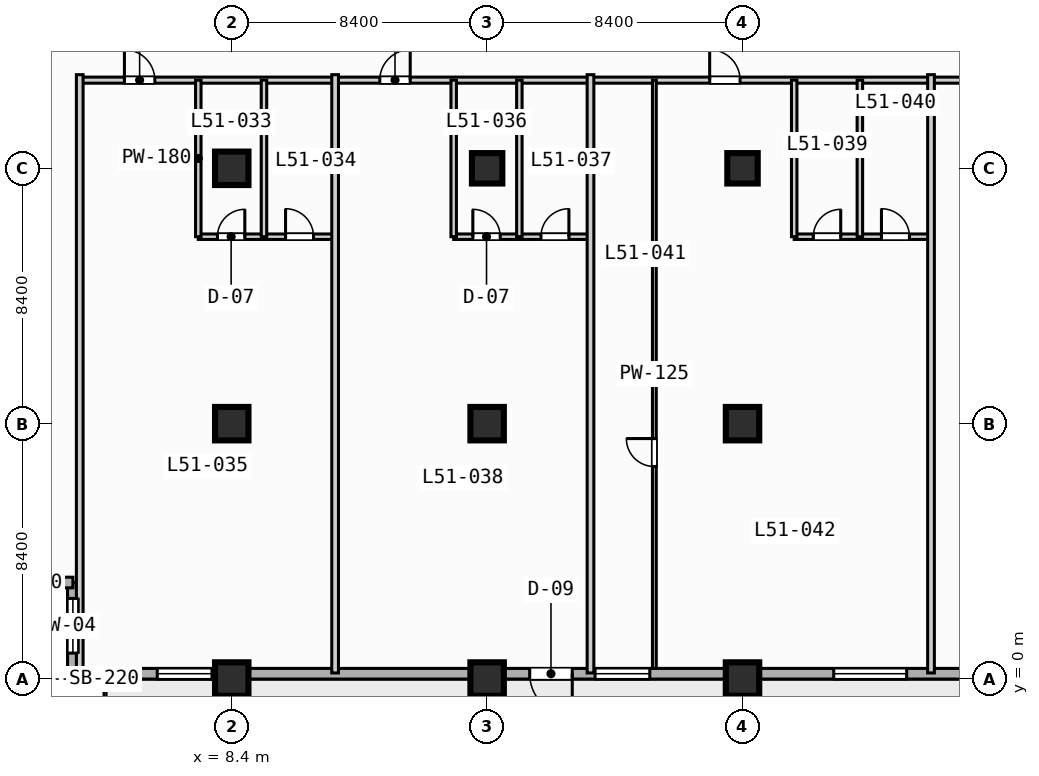
"""IFC4 building model, lengths in metres.
Left out: names, types, materials, properties, quantities, classifications, styles, units other than length and angle.
Written with IfcOpenShell. Run it as: python <this file> out.ifc"""

import sys

from ifc_helpers import new_model, si_unit, direction, frame, frame_2d, origin, origin_2d, place, context, subcontext, project, spatial, rectangle, extrude, element, fill, save


model = new_model("IFC4")
c1 = context("Model", 3, precision=1e-05, world=origin(), true_north=direction((0.0, 1.0)))
c2 = subcontext(c1, "Body", "Model", "MODEL_VIEW")
j1 = project(units=[si_unit("LENGTHUNIT", "METRE"), si_unit("PLANEANGLEUNIT", "RADIAN")], contexts=[c1])
p1 = place(None, origin())
s1 = spatial("IfcSite", under=j1, at=p1, CompositionType="ELEMENT")
p2 = place(p1, origin())
s2 = spatial("IfcBuilding", under=s1, at=p2, CompositionType="ELEMENT")
p3 = place(p2, frame((0.0, 0.0, 208.7)))
s3 = spatial("IfcBuildingStorey", under=s2, at=p3, CompositionType="ELEMENT", Elevation=208.7)
for number, where, z_axis, x_axis in (
    (1, (8.4, 0.0, 0.0), (0.0, 0.0, 1.0), (1.0, 0.0, 0.0)),
    (2, (8.4, 8.4, 0.0), (0.0, 0.0, 1.0), (1.0, 0.0, 0.0)),
    (3, (8.4, 16.8, 0.0), (0.0, 0.0, 1.0), (1.0, 0.0, 0.0)),
    (4, (16.8, 0.0, 0.0), (0.0, 0.0, 1.0), (1.0, 0.0, 0.0)),
    (5, (16.8, 8.4, 0.0), (0.0, 0.0, 1.0), (1.0, 0.0, 0.0)),
):
    element("IfcColumn", number, at=place(p3, frame(where, z_axis=z_axis, x_axis=x_axis)), inside=s3, PredefinedType="COLUMN", context=c2, shape_type="SweptSolid", body=[
        extrude(rectangle(XDim=1.1, YDim=1.1, at=origin_2d()), origin(), (0.0, 0.0, 1.0), 3.7),
    ])
p4 = place(p3, frame((16.8, 16.8, 0.0), z_axis=(0.0, 0.0, 1.0), x_axis=(1.0, 0.0, 0.0)))
e6 = element("IfcColumn", 6, at=p4, inside=s3, PredefinedType="COLUMN", context=c2, shape_type="SweptSolid", body=[
    extrude(rectangle(XDim=1.0, YDim=1.0, at=origin_2d()), origin(), (0.0, 0.0, 1.0), 3.7),
])
for number, where, z_axis, x_axis in (
    (7, (25.2, 0.0, 0.0), (0.0, 0.0, 1.0), (1.0, 0.0, 0.0)),
    (8, (25.2, 8.4, 0.0), (0.0, 0.0, 1.0), (1.0, 0.0, 0.0)),
):
    element("IfcColumn", number, at=place(p3, frame(where, z_axis=z_axis, x_axis=x_axis)), inside=s3, PredefinedType="COLUMN", context=c2, shape_type="SweptSolid", body=[
        extrude(rectangle(XDim=1.1, YDim=1.1, at=origin_2d()), origin(), (0.0, 0.0, 1.0), 3.7),
    ])
p5 = place(p3, frame((25.2, 16.8, 0.0), z_axis=(0.0, 0.0, 1.0), x_axis=(1.0, 0.0, 0.0)))
e9 = element("IfcColumn", 9, at=p5, inside=s3, PredefinedType="COLUMN", context=c2, shape_type="SweptSolid", body=[
    extrude(rectangle(XDim=1.0, YDim=1.0, at=origin_2d()), origin(), (0.0, 0.0, 1.0), 3.7),
])
p6 = place(p3, frame((3.175, 0.175, 0.0), z_axis=(0.0, 0.0, 1.0), x_axis=(0.0, 1.0, 0.0)))
e10 = element("IfcWall", 10, at=p6, inside=s3, PredefinedType="STANDARD", context=c2, shape_type="SweptSolid", body=[
    extrude(rectangle(XDim=3.0, YDim=0.35, at=frame_2d((1.5, 0.0))), origin(), (0.0, 0.0, 1.0), 3.47),
])
p7 = place(p6, frame((0.677, 0.0, 0.85)))
e11 = element("IfcOpeningElement", 11, at=p7, cuts=e10, PredefinedType="OPENING", context=c2, shape_type="SweptSolid", body=[
    extrude(rectangle(XDim=1.8, YDim=1.8, at=frame_2d((0.9, 0.9))), frame((0.0, 0.185, 0.0), z_axis=(0.0, -1.0, 0.0), x_axis=(1.0, 0.0, 0.0)), (0.0, 0.0, 1.0), 0.37),
])
p8 = place(p3, frame((3.175, 3.175, 0.0), z_axis=(0.0, 0.0, 1.0), x_axis=(-1.0, 0.0, 0.0)))
e12 = element("IfcWall", 12, at=p8, inside=s3, PredefinedType="STANDARD", context=c2, shape_type="SweptSolid", body=[
    extrude(rectangle(XDim=3.0, YDim=0.35, at=frame_2d((1.5, 0.0))), origin(), (0.0, 0.0, 1.0), 3.47),
])
p9 = place(p3, frame((72.425, 0.175, 0.0), z_axis=(0.0, 0.0, 1.0), x_axis=(-1.0, 0.0, 0.0)))
e13 = element("IfcWall", 13, at=p9, inside=s3, PredefinedType="STANDARD", context=c2, shape_type="SweptSolid", body=[
    extrude(rectangle(XDim=69.25, YDim=0.35, at=frame_2d((34.625, 0.0))), origin(), (0.0, 0.0, 1.0), 3.47),
])
p10 = place(p9, frame((52.825, 0.0, 0.0)))
e14 = element("IfcOpeningElement", 14, at=p10, cuts=e13, PredefinedType="OPENING", context=c2, shape_type="SweptSolid", body=[
    extrude(rectangle(XDim=1.4, YDim=2.2, at=frame_2d((0.7, 1.1))), frame((0.0, 0.185, 0.0), z_axis=(0.0, -1.0, 0.0), x_axis=(1.0, 0.0, 0.0)), (0.0, 0.0, 1.0), 0.37),
])
p11 = place(p9, frame((41.825, 0.0, 0.85)))
e15 = element("IfcOpeningElement", 15, at=p11, cuts=e13, PredefinedType="OPENING", context=c2, shape_type="SweptSolid", body=[
    extrude(rectangle(XDim=2.4, YDim=1.95, at=frame_2d((1.2, 0.975))), frame((0.0, 0.185, 0.0), z_axis=(0.0, -1.0, 0.0), x_axis=(1.0, 0.0, 0.0)), (0.0, 0.0, 1.0), 0.37),
])
p12 = place(p9, frame((33.725, 0.0, 0.85)))
e16 = element("IfcOpeningElement", 16, at=p12, cuts=e13, PredefinedType="OPENING", context=c2, shape_type="SweptSolid", body=[
    extrude(rectangle(XDim=1.8, YDim=1.8, at=frame_2d((0.9, 0.9))), frame((0.0, 0.185, 0.0), z_axis=(0.0, -1.0, 0.0), x_axis=(1.0, 0.0, 0.0)), (0.0, 0.0, 1.0), 0.37),
])
p13 = place(p9, frame((25.025, 0.0, 0.85)))
e17 = element("IfcOpeningElement", 17, at=p13, cuts=e13, PredefinedType="OPENING", context=c2, shape_type="SweptSolid", body=[
    extrude(rectangle(XDim=2.4, YDim=1.95, at=frame_2d((1.2, 0.975))), frame((0.0, 0.185, 0.0), z_axis=(0.0, -1.0, 0.0), x_axis=(1.0, 0.0, 0.0)), (0.0, 0.0, 1.0), 0.37),
])
p14 = place(p9, frame((64.675, 0.0, 0.85)))
e18 = element("IfcOpeningElement", 18, at=p14, cuts=e13, PredefinedType="OPENING", context=c2, shape_type="SweptSolid", body=[
    extrude(rectangle(XDim=1.8, YDim=1.8, at=frame_2d((0.9, 0.9))), frame((0.0, 0.185, 0.0), z_axis=(0.0, -1.0, 0.0), x_axis=(1.0, 0.0, 0.0)), (0.0, 0.0, 1.0), 0.37),
])
p15 = place(p9, frame((50.275, 0.0, 0.85)))
e19 = element("IfcOpeningElement", 19, at=p15, cuts=e13, PredefinedType="OPENING", context=c2, shape_type="SweptSolid", body=[
    extrude(rectangle(XDim=1.8, YDim=1.8, at=frame_2d((0.9, 0.9))), frame((0.0, 0.185, 0.0), z_axis=(0.0, -1.0, 0.0), x_axis=(1.0, 0.0, 0.0)), (0.0, 0.0, 1.0), 0.37),
])
p16 = place(p3, frame((3.4, 19.7, 0.0), z_axis=(0.0, 0.0, 1.0), x_axis=(1.0, 0.0, 0.0)))
e20 = element("IfcWall", 20, at=p16, inside=s3, PredefinedType="PARTITIONING", context=c2, shape_type="SweptSolid", body=[
    extrude(rectangle(XDim=35.8, YDim=0.2, at=frame_2d((17.9, 0.0))), origin(), (0.0, 0.0, 1.0), 3.47),
])
p17 = place(p16, frame((1.47, 0.0, 0.0)))
e21 = element("IfcOpeningElement", 21, at=p17, cuts=e20, PredefinedType="OPENING", context=c2, shape_type="SweptSolid", body=[
    extrude(rectangle(XDim=1.0, YDim=2.15, at=frame_2d((0.5, 1.075))), frame((0.0, 0.11, 0.0), z_axis=(0.0, -1.0, 0.0), x_axis=(1.0, 0.0, 0.0)), (0.0, 0.0, 1.0), 0.22),
])
p18 = place(p16, frame((9.87, 0.0, 0.0)))
e22 = element("IfcOpeningElement", 22, at=p18, cuts=e20, PredefinedType="OPENING", context=c2, shape_type="SweptSolid", body=[
    extrude(rectangle(XDim=1.0, YDim=2.15, at=frame_2d((0.5, 1.075))), frame((0.0, 0.11, 0.0), z_axis=(0.0, -1.0, 0.0), x_axis=(1.0, 0.0, 0.0)), (0.0, 0.0, 1.0), 0.22),
])
p19 = place(p16, frame((20.72, 0.0, 0.0)))
e23 = element("IfcOpeningElement", 23, at=p19, cuts=e20, PredefinedType="OPENING", context=c2, shape_type="SweptSolid", body=[
    extrude(rectangle(XDim=1.0, YDim=2.15, at=frame_2d((0.5, 1.075))), frame((0.0, 0.11, 0.0), z_axis=(0.0, -1.0, 0.0), x_axis=(1.0, 0.0, 0.0)), (0.0, 0.0, 1.0), 0.22),
])
p20 = place(p16, frame((29.17, 0.0, 0.0)))
e24 = element("IfcOpeningElement", 24, at=p20, cuts=e20, PredefinedType="OPENING", context=c2, shape_type="SweptSolid", body=[
    extrude(rectangle(XDim=1.0, YDim=2.15, at=frame_2d((0.5, 1.075))), frame((0.0, 0.11, 0.0), z_axis=(0.0, -1.0, 0.0), x_axis=(1.0, 0.0, 0.0)), (0.0, 0.0, 1.0), 0.22),
])
p21 = place(p3, frame((3.4, 0.2, 0.0), z_axis=(0.0, 0.0, 1.0), x_axis=(0.0, 1.0, 0.0)))
e25 = element("IfcWall", 25, at=p21, inside=s3, PredefinedType="PARTITIONING", context=c2, shape_type="SweptSolid", body=[
    extrude(rectangle(XDim=19.68, YDim=0.22, at=frame_2d((9.84, 0.0))), origin(), (0.0, 0.0, 1.0), 3.47),
])
p22 = place(p3, frame((7.3, 14.55, 0.0), z_axis=(0.0, 0.0, 1.0), x_axis=(1.0, 0.0, 0.0)))
e26 = element("IfcWall", 26, at=p22, inside=s3, PredefinedType="PLUMBINGWALL", context=c2, shape_type="SweptSolid", body=[
    extrude(rectangle(XDim=4.5, YDim=0.18, at=frame_2d((2.25, 0.0))), origin(), (0.0, 0.0, 1.0), 3.47),
])
p23 = place(p22, frame((0.63, 0.0, 0.0)))
e27 = element("IfcOpeningElement", 27, at=p23, cuts=e26, PredefinedType="OPENING", context=c2, shape_type="SweptSolid", body=[
    extrude(rectangle(XDim=0.9, YDim=2.1, at=frame_2d((0.45, 1.05))), frame((0.0, 0.1, 0.0), z_axis=(0.0, -1.0, 0.0), x_axis=(1.0, 0.0, 0.0)), (0.0, 0.0, 1.0), 0.2),
])
p24 = place(p22, frame((2.87, 0.0, 0.0)))
e28 = element("IfcOpeningElement", 28, at=p24, cuts=e26, PredefinedType="OPENING", context=c2, shape_type="SweptSolid", body=[
    extrude(rectangle(XDim=0.92, YDim=2.1, at=frame_2d((0.46, 1.05))), frame((0.0, 0.1, 0.0), z_axis=(0.0, -1.0, 0.0), x_axis=(1.0, 0.0, 0.0)), (0.0, 0.0, 1.0), 0.2),
])
for number, where, z_axis, x_axis in (
    (29, (7.3, 14.55, 0.0), (0.0, 0.0, 1.0), (0.0, 1.0, 0.0)),
    (30, (9.46, 14.55, 0.0), (0.0, 0.0, 1.0), (0.0, 1.0, 0.0)),
):
    element("IfcWall", number, at=place(p3, frame(where, z_axis=z_axis, x_axis=x_axis)), inside=s3, PredefinedType="PLUMBINGWALL", context=c2, shape_type="SweptSolid", body=[
        extrude(rectangle(XDim=5.15, YDim=0.18, at=frame_2d((2.575, 0.0))), origin(), (0.0, 0.0, 1.0), 3.47),
    ])
p25 = place(p3, frame((11.8, 0.2, 0.0), z_axis=(0.0, 0.0, 1.0), x_axis=(0.0, 1.0, 0.0)))
e31 = element("IfcWall", 31, at=p25, inside=s3, PredefinedType="PARTITIONING", context=c2, shape_type="SweptSolid", body=[
    extrude(rectangle(XDim=19.68, YDim=0.22, at=frame_2d((9.84, 0.0))), origin(), (0.0, 0.0, 1.0), 3.47),
])
p26 = place(p3, frame((15.7, 14.55, 0.0), z_axis=(0.0, 0.0, 1.0), x_axis=(1.0, 0.0, 0.0)))
e32 = element("IfcWall", 32, at=p26, inside=s3, PredefinedType="PLUMBINGWALL", context=c2, shape_type="SweptSolid", body=[
    extrude(rectangle(XDim=4.5, YDim=0.18, at=frame_2d((2.25, 0.0))), origin(), (0.0, 0.0, 1.0), 3.47),
])
p27 = place(p26, frame((0.63, 0.0, 0.0)))
e33 = element("IfcOpeningElement", 33, at=p27, cuts=e32, PredefinedType="OPENING", context=c2, shape_type="SweptSolid", body=[
    extrude(rectangle(XDim=0.9, YDim=2.1, at=frame_2d((0.45, 1.05))), frame((0.0, 0.1, 0.0), z_axis=(0.0, -1.0, 0.0), x_axis=(1.0, 0.0, 0.0)), (0.0, 0.0, 1.0), 0.2),
])
p28 = place(p26, frame((2.87, 0.0, 0.0)))
e34 = element("IfcOpeningElement", 34, at=p28, cuts=e32, PredefinedType="OPENING", context=c2, shape_type="SweptSolid", body=[
    extrude(rectangle(XDim=0.92, YDim=2.1, at=frame_2d((0.46, 1.05))), frame((0.0, 0.1, 0.0), z_axis=(0.0, -1.0, 0.0), x_axis=(1.0, 0.0, 0.0)), (0.0, 0.0, 1.0), 0.2),
])
for number, where, z_axis, x_axis in (
    (35, (15.7, 14.55, 0.0), (0.0, 0.0, 1.0), (0.0, 1.0, 0.0)),
    (36, (17.86, 14.55, 0.0), (0.0, 0.0, 1.0), (0.0, 1.0, 0.0)),
):
    element("IfcWall", number, at=place(p3, frame(where, z_axis=z_axis, x_axis=x_axis)), inside=s3, PredefinedType="PLUMBINGWALL", context=c2, shape_type="SweptSolid", body=[
        extrude(rectangle(XDim=5.15, YDim=0.18, at=frame_2d((2.575, 0.0))), origin(), (0.0, 0.0, 1.0), 3.47),
    ])
p29 = place(p3, frame((20.2, 0.2, 0.0), z_axis=(0.0, 0.0, 1.0), x_axis=(0.0, 1.0, 0.0)))
e37 = element("IfcWall", 37, at=p29, inside=s3, PredefinedType="PARTITIONING", context=c2, shape_type="SweptSolid", body=[
    extrude(rectangle(XDim=19.68, YDim=0.22, at=frame_2d((9.84, 0.0))), origin(), (0.0, 0.0, 1.0), 3.47),
])
p30 = place(p3, frame((26.9, 14.55, 0.0), z_axis=(0.0, 0.0, 1.0), x_axis=(1.0, 0.0, 0.0)))
e38 = element("IfcWall", 38, at=p30, inside=s3, PredefinedType="PLUMBINGWALL", context=c2, shape_type="SweptSolid", body=[
    extrude(rectangle(XDim=4.5, YDim=0.18, at=frame_2d((2.25, 0.0))), origin(), (0.0, 0.0, 1.0), 3.47),
])
p31 = place(p30, frame((0.63, 0.0, 0.0)))
e39 = element("IfcOpeningElement", 39, at=p31, cuts=e38, PredefinedType="OPENING", context=c2, shape_type="SweptSolid", body=[
    extrude(rectangle(XDim=0.9, YDim=2.1, at=frame_2d((0.45, 1.05))), frame((0.0, 0.1, 0.0), z_axis=(0.0, -1.0, 0.0), x_axis=(1.0, 0.0, 0.0)), (0.0, 0.0, 1.0), 0.2),
])
p32 = place(p30, frame((2.87, 0.0, 0.0)))
e40 = element("IfcOpeningElement", 40, at=p32, cuts=e38, PredefinedType="OPENING", context=c2, shape_type="SweptSolid", body=[
    extrude(rectangle(XDim=0.92, YDim=2.1, at=frame_2d((0.46, 1.05))), frame((0.0, 0.1, 0.0), z_axis=(0.0, -1.0, 0.0), x_axis=(1.0, 0.0, 0.0)), (0.0, 0.0, 1.0), 0.2),
])
for number, where, z_axis, x_axis in (
    (41, (26.9, 14.55, 0.0), (0.0, 0.0, 1.0), (0.0, 1.0, 0.0)),
    (42, (29.06, 14.55, 0.0), (0.0, 0.0, 1.0), (0.0, 1.0, 0.0)),
):
    element("IfcWall", number, at=place(p3, frame(where, z_axis=z_axis, x_axis=x_axis)), inside=s3, PredefinedType="PLUMBINGWALL", context=c2, shape_type="SweptSolid", body=[
        extrude(rectangle(XDim=5.15, YDim=0.18, at=frame_2d((2.575, 0.0))), origin(), (0.0, 0.0, 1.0), 3.47),
    ])
p33 = place(p3, frame((22.3, 0.35, 0.0), z_axis=(0.0, 0.0, 1.0), x_axis=(0.0, 1.0, 0.0)))
e43 = element("IfcWall", 43, at=p33, inside=s3, PredefinedType="PARTITIONING", context=c2, shape_type="SweptSolid", body=[
    extrude(rectangle(XDim=19.35, YDim=0.125, at=frame_2d((9.675, 0.0))), origin(), (0.0, 0.0, 1.0), 3.47),
])
p34 = place(p33, frame((6.64, 0.0, 0.0)))
e44 = element("IfcOpeningElement", 44, at=p34, cuts=e43, PredefinedType="OPENING", context=c2, shape_type="SweptSolid", body=[
    extrude(rectangle(XDim=0.92, YDim=2.1, at=frame_2d((0.46, 1.05))), frame((0.0, 0.073, 0.0), z_axis=(0.0, -1.0, 0.0), x_axis=(1.0, 0.0, 0.0)), (0.0, 0.0, 1.0), 0.145),
])
p35 = place(p3, frame((31.4, 0.2, 0.0), z_axis=(0.0, 0.0, 1.0), x_axis=(0.0, 1.0, 0.0)))
e45 = element("IfcWall", 45, at=p35, inside=s3, PredefinedType="PARTITIONING", context=c2, shape_type="SweptSolid", body=[
    extrude(rectangle(XDim=19.68, YDim=0.22, at=frame_2d((9.84, 0.0))), origin(), (0.0, 0.0, 1.0), 3.47),
])
p36 = place(p7, origin())
e46 = element("IfcWindow", 46, at=p36, inside=s3, PartitioningType="SINGLE_PANEL", PredefinedType="WINDOW", context=c2, shape_type="SweptSolid", body=[
    extrude(rectangle(XDim=1.8, YDim=1.8, at=frame_2d((0.9, 0.9))), frame((0.0, 0.03, 0.0), z_axis=(0.0, -1.0, 0.0), x_axis=(1.0, 0.0, 0.0)), (0.0, 0.0, 1.0), 0.06),
])
fill(e11, e46)
p37 = place(p10, origin())
e47 = element("IfcDoor", 47, at=p37, inside=s3, OperationType="SINGLE_SWING_LEFT", PredefinedType="DOOR", context=c2, shape_type="SweptSolid", body=[
    extrude(rectangle(XDim=1.4, YDim=2.2, at=frame_2d((0.7, 1.1))), frame((0.0, 0.025, 0.0), z_axis=(0.0, -1.0, 0.0), x_axis=(1.0, 0.0, 0.0)), (0.0, 0.0, 1.0), 0.05),
])
fill(e14, e47)
p38 = place(p11, origin())
e48 = element("IfcWindow", 48, at=p38, inside=s3, PartitioningType="SINGLE_PANEL", PredefinedType="WINDOW", context=c2, shape_type="SweptSolid", body=[
    extrude(rectangle(XDim=2.4, YDim=1.95, at=frame_2d((1.2, 0.975))), frame((0.0, 0.03, 0.0), z_axis=(0.0, -1.0, 0.0), x_axis=(1.0, 0.0, 0.0)), (0.0, 0.0, 1.0), 0.06),
])
fill(e15, e48)
p39 = place(p14, origin())
e49 = element("IfcWindow", 49, at=p39, inside=s3, PartitioningType="SINGLE_PANEL", PredefinedType="WINDOW", context=c2, shape_type="SweptSolid", body=[
    extrude(rectangle(XDim=1.8, YDim=1.8, at=frame_2d((0.9, 0.9))), frame((0.0, 0.03, 0.0), z_axis=(0.0, -1.0, 0.0), x_axis=(1.0, 0.0, 0.0)), (0.0, 0.0, 1.0), 0.06),
])
fill(e18, e49)
p40 = place(p15, origin())
e50 = element("IfcWindow", 50, at=p40, inside=s3, PartitioningType="SINGLE_PANEL", PredefinedType="WINDOW", context=c2, shape_type="SweptSolid", body=[
    extrude(rectangle(XDim=1.8, YDim=1.8, at=frame_2d((0.9, 0.9))), frame((0.0, 0.03, 0.0), z_axis=(0.0, -1.0, 0.0), x_axis=(1.0, 0.0, 0.0)), (0.0, 0.0, 1.0), 0.06),
])
fill(e19, e50)
p41 = place(p17, origin())
e51 = element("IfcDoor", 51, at=p41, inside=s3, OperationType="SINGLE_SWING_LEFT", PredefinedType="DOOR", context=c2, shape_type="SweptSolid", body=[
    extrude(rectangle(XDim=1.0, YDim=2.15, at=frame_2d((0.5, 1.075))), frame((0.0, 0.025, 0.0), z_axis=(0.0, -1.0, 0.0), x_axis=(1.0, 0.0, 0.0)), (0.0, 0.0, 1.0), 0.05),
])
fill(e21, e51)
p42 = place(p18, origin())
e52 = element("IfcDoor", 52, at=p42, inside=s3, OperationType="SINGLE_SWING_RIGHT", PredefinedType="DOOR", context=c2, shape_type="SweptSolid", body=[
    extrude(rectangle(XDim=1.0, YDim=2.15, at=frame_2d((0.5, 1.075))), frame((0.0, 0.025, 0.0), z_axis=(0.0, -1.0, 0.0), x_axis=(1.0, 0.0, 0.0)), (0.0, 0.0, 1.0), 0.05),
])
fill(e22, e52)
p43 = place(p19, origin())
e53 = element("IfcDoor", 53, at=p43, inside=s3, OperationType="SINGLE_SWING_LEFT", PredefinedType="DOOR", context=c2, shape_type="SweptSolid", body=[
    extrude(rectangle(XDim=1.0, YDim=2.15, at=frame_2d((0.5, 1.075))), frame((0.0, 0.025, 0.0), z_axis=(0.0, -1.0, 0.0), x_axis=(1.0, 0.0, 0.0)), (0.0, 0.0, 1.0), 0.05),
])
fill(e23, e53)
p44 = place(p23, origin())
e54 = element("IfcDoor", 54, at=p44, inside=s3, OperationType="SINGLE_SWING_RIGHT", PredefinedType="DOOR", context=c2, shape_type="SweptSolid", body=[
    extrude(rectangle(XDim=0.9, YDim=2.1, at=frame_2d((0.45, 1.05))), frame((0.0, 0.025, 0.0), z_axis=(0.0, -1.0, 0.0), x_axis=(1.0, 0.0, 0.0)), (0.0, 0.0, 1.0), 0.05),
])
fill(e27, e54)
p45 = place(p24, origin())
e55 = element("IfcDoor", 55, at=p45, inside=s3, OperationType="SINGLE_SWING_LEFT", PredefinedType="DOOR", context=c2, shape_type="SweptSolid", body=[
    extrude(rectangle(XDim=0.92, YDim=2.1, at=frame_2d((0.46, 1.05))), frame((0.0, 0.025, 0.0), z_axis=(0.0, -1.0, 0.0), x_axis=(1.0, 0.0, 0.0)), (0.0, 0.0, 1.0), 0.05),
])
fill(e28, e55)
p46 = place(p27, origin())
e56 = element("IfcDoor", 56, at=p46, inside=s3, OperationType="SINGLE_SWING_LEFT", PredefinedType="DOOR", context=c2, shape_type="SweptSolid", body=[
    extrude(rectangle(XDim=0.9, YDim=2.1, at=frame_2d((0.45, 1.05))), frame((0.0, 0.025, 0.0), z_axis=(0.0, -1.0, 0.0), x_axis=(1.0, 0.0, 0.0)), (0.0, 0.0, 1.0), 0.05),
])
fill(e33, e56)
p47 = place(p28, origin())
e57 = element("IfcDoor", 57, at=p47, inside=s3, OperationType="SINGLE_SWING_RIGHT", PredefinedType="DOOR", context=c2, shape_type="SweptSolid", body=[
    extrude(rectangle(XDim=0.92, YDim=2.1, at=frame_2d((0.46, 1.05))), frame((0.0, 0.025, 0.0), z_axis=(0.0, -1.0, 0.0), x_axis=(1.0, 0.0, 0.0)), (0.0, 0.0, 1.0), 0.05),
])
fill(e34, e57)
p48 = place(p31, origin())
e58 = element("IfcDoor", 58, at=p48, inside=s3, OperationType="SINGLE_SWING_RIGHT", PredefinedType="DOOR", context=c2, shape_type="SweptSolid", body=[
    extrude(rectangle(XDim=0.9, YDim=2.1, at=frame_2d((0.45, 1.05))), frame((0.0, 0.025, 0.0), z_axis=(0.0, -1.0, 0.0), x_axis=(1.0, 0.0, 0.0)), (0.0, 0.0, 1.0), 0.05),
])
fill(e39, e58)
p49 = place(p32, origin())
e59 = element("IfcDoor", 59, at=p49, inside=s3, OperationType="SINGLE_SWING_LEFT", PredefinedType="DOOR", context=c2, shape_type="SweptSolid", body=[
    extrude(rectangle(XDim=0.92, YDim=2.1, at=frame_2d((0.46, 1.05))), frame((0.0, 0.025, 0.0), z_axis=(0.0, -1.0, 0.0), x_axis=(1.0, 0.0, 0.0)), (0.0, 0.0, 1.0), 0.05),
])
fill(e40, e59)
p50 = place(p34, origin())
e60 = element("IfcDoor", 60, at=p50, inside=s3, OperationType="SINGLE_SWING_RIGHT", PredefinedType="DOOR", context=c2, shape_type="SweptSolid", body=[
    extrude(rectangle(XDim=0.92, YDim=2.1, at=frame_2d((0.46, 1.05))), frame((0.0, 0.025, 0.0), z_axis=(0.0, -1.0, 0.0), x_axis=(1.0, 0.0, 0.0)), (0.0, 0.0, 1.0), 0.05),
])
fill(e44, e60)
save(model, sys.argv[1])
